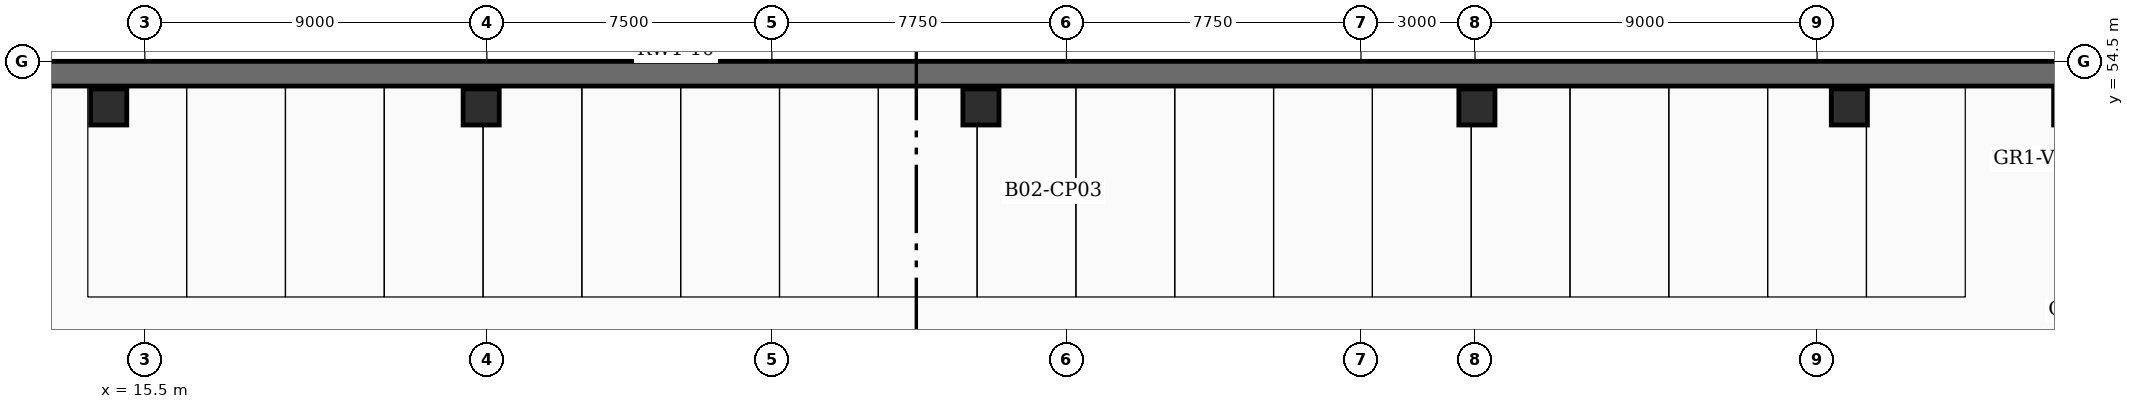
"""IFC4 building model, lengths in metres.
Left out: names, types, materials, properties, quantities, classifications, styles, units other than length and angle.
Written with IfcOpenShell. Run it as: python <this file> out.ifc"""

import sys

from ifc_helpers import new_model, si_unit, direction, frame, frame_2d, origin, origin_2d, place, context, subcontext, project, spatial, rectangle, extrude, element, save


model = new_model("IFC4")
c1 = context("Model", 3, precision=1e-05, world=origin(), true_north=direction((0.0, 1.0)))
c2 = subcontext(c1, "Body", "Model", "MODEL_VIEW")
j1 = project(units=[si_unit("LENGTHUNIT", "METRE"), si_unit("PLANEANGLEUNIT", "RADIAN")], contexts=[c1])
p1 = place(None, origin())
s1 = spatial("IfcSite", under=j1, at=p1, CompositionType="ELEMENT")
p2 = place(p1, origin())
s2 = spatial("IfcBuilding", under=s1, at=p2, CompositionType="ELEMENT")
p3 = place(p2, frame((0.0, 0.0, -10.0)))
s3 = spatial("IfcBuildingStorey", under=s2, at=p3, CompositionType="ELEMENT", Elevation=-10.0)
p4 = place(p3, frame((5.485, 54.175, -0.85), z_axis=(0.0, 0.0, 1.0), x_axis=(1.0, 0.0, 0.0)))
e1 = element("IfcWall", 1, at=p4, inside=s3, PredefinedType="USERDEFINED", context=c2, shape_type="SweptSolid", body=[
    extrude(rectangle(XDim=68.53, YDim=0.65, at=frame_2d((34.265, 0.0))), origin(), (0.0, 0.0, 1.0), 5.54),
])
for number, where, z_axis, x_axis in (
    (2, (66.2, 53.3, -0.85), (0.0, 0.0, 1.0), (1.0, 0.0, 0.0)),
    (3, (60.35, 53.3, -0.85), (0.0, 0.0, 1.0), (1.0, 0.0, 0.0)),
    (4, (50.55, 53.3, -0.85), (0.0, 0.0, 1.0), (1.0, 0.0, 0.0)),
    (5, (37.5, 53.3, -0.85), (0.0, 0.0, 1.0), (1.0, 0.0, 0.0)),
    (6, (24.35, 53.3, -0.85), (0.0, 0.0, 1.0), (1.0, 0.0, 0.0)),
    (7, (14.55, 53.3, -0.85), (0.0, 0.0, 1.0), (1.0, 0.0, 0.0)),
):
    element("IfcColumn", number, at=place(p3, frame(where, z_axis=z_axis, x_axis=x_axis)), inside=s3, PredefinedType="COLUMN", context=c2, shape_type="SweptSolid", body=[
        extrude(rectangle(XDim=0.95, YDim=0.95, at=origin_2d()), origin(), (0.0, 0.0, 1.0), 5.54),
    ])
save(model, sys.argv[1])
